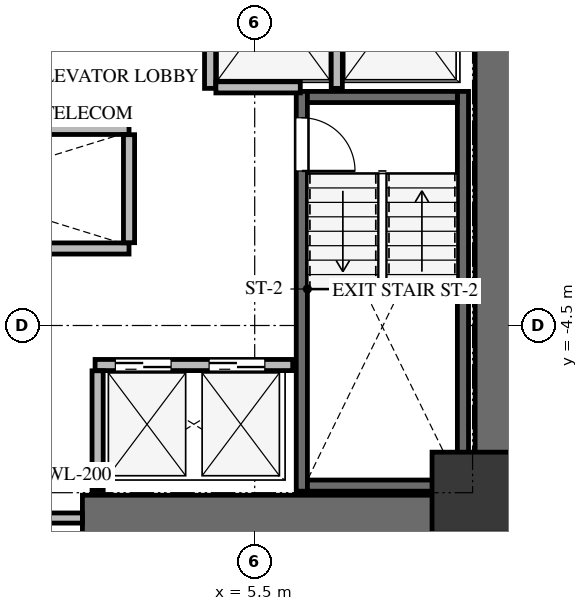
"""IFC4 building model, lengths in metres.
Left out: names, types, materials, properties, quantities, classifications, styles, units other than length and angle.
Written with IfcOpenShell. Run it as: python <this file> out.ifc"""

import sys

from ifc_helpers import new_model, si_unit, direction, frame, frame_2d, origin, origin_2d, place, context, subcontext, project, spatial, rectangle, extrude, source, transform, mapped, element, fill, save


model = new_model("IFC4")
c1 = context("Model", 3, precision=1e-05, world=origin(), true_north=direction((0.0, 1.0)))
c2 = subcontext(c1, "Body", "Model", "MODEL_VIEW")
j1 = project(units=[si_unit("LENGTHUNIT", "METRE"), si_unit("PLANEANGLEUNIT", "RADIAN")], contexts=[c1])
p1 = place(None, origin())
s1 = spatial("IfcSite", under=j1, at=p1, CompositionType="ELEMENT")
p2 = place(p1, origin())
s2 = spatial("IfcBuilding", under=s1, at=p2, CompositionType="ELEMENT")
p3 = place(p2, frame((0.0, 0.0, 78.3)))
s3 = spatial("IfcBuildingStorey", under=s2, at=p3, CompositionType="ELEMENT", Elevation=78.3)
p4 = place(p3, frame((10.3, -8.75, 0.0), z_axis=(0.0, 0.0, 1.0), x_axis=(0.0, 1.0, 0.0)))
e1 = element("IfcWall", 1, at=p4, inside=s3, PredefinedType="SHEAR", context=c2, shape_type="SweptSolid", body=[
    extrude(rectangle(XDim=17.5, YDim=0.9, at=frame_2d((8.75, 0.0))), origin(), (0.0, 0.0, 1.0), 3.0),
])
p5 = place(p3, frame((2.1, -8.3, 0.0), z_axis=(0.0, 0.0, 1.0), x_axis=(1.0, 0.0, 0.0)))
e2 = element("IfcWall", 2, at=p5, inside=s3, PredefinedType="SHEAR", context=c2, shape_type="SweptSolid", body=[
    extrude(rectangle(XDim=7.75, YDim=0.9, at=frame_2d((3.875, 0.0))), origin(), (0.0, 0.0, 1.0), 3.0),
])
p6 = place(p3, frame((9.61, -7.77, -0.24), z_axis=(0.0, 0.0, 1.0), x_axis=(0.0, 1.0, 0.0)))
e3 = element("IfcWall", 3, at=p6, inside=s3, PredefinedType="SHEAR", context=c2, shape_type="SweptSolid", body=[
    extrude(rectangle(XDim=7.89, YDim=0.22, at=frame_2d((3.945, 0.0))), origin(), (0.0, 0.0, 1.0), 3.0),
])
p7 = place(p3, frame((6.43, 0.12, -0.24), z_axis=(0.0, 0.0, 1.0), x_axis=(0.0, -1.0, 0.0)))
e4 = element("IfcWall", 4, at=p7, inside=s3, PredefinedType="SHEAR", context=c2, shape_type="SweptSolid", body=[
    extrude(rectangle(XDim=7.89, YDim=0.22, at=frame_2d((3.945, 0.0))), origin(), (0.0, 0.0, 1.0), 3.0),
])
p8 = place(p7, frame((0.52, 0.0, 0.0)))
e5 = element("IfcOpeningElement", 5, at=p8, cuts=e4, PredefinedType="OPENING", context=c2, shape_type="SweptSolid", body=[
    extrude(rectangle(XDim=1.05, YDim=2.15, at=frame_2d((0.525, 1.075))), frame((0.0, 0.12, 0.0), z_axis=(0.0, -1.0, 0.0), x_axis=(1.0, 0.0, 0.0)), (0.0, 0.0, 1.0), 0.24),
])
for number, where, z_axis, x_axis in (
    (6, (6.54, -7.66, -0.24), (0.0, 0.0, 1.0), (1.0, 0.0, 0.0)),
    (7, (9.5, 0.01, -0.24), (0.0, 0.0, 1.0), (-1.0, 0.0, 0.0)),
):
    element("IfcWall", number, at=place(p3, frame(where, z_axis=z_axis, x_axis=x_axis)), inside=s3, PredefinedType="SHEAR", context=c2, shape_type="SweptSolid", body=[
        extrude(rectangle(XDim=2.96, YDim=0.22, at=frame_2d((1.48, 0.0))), origin(), (0.0, 0.0, 1.0), 3.0),
    ])
m1 = source(origin(), c2, "Body", "SweptSolid", [
    extrude(rectangle(XDim=1.6, YDim=1.6, at=origin_2d()), origin(), (0.0, 0.0, 1.0), 3.0),
])
p9 = place(p3, frame((9.8, -7.8, -0.24), z_axis=(0.0, 0.0, 1.0), x_axis=(1.0, 0.0, 0.0)))
e8 = element("IfcColumn", 8, at=p9, inside=s3, PredefinedType="COLUMN", context=c2, shape_type="MappedRepresentation", body=[
    mapped(m1, transform((0.0, 0.0, 0.0), x_axis=(1.0, 0.0, 0.0), y_axis=(0.0, 1.0, 0.0), z_axis=(0.0, 0.0, 1.0), scale=1.0)),
])
p10 = place(p3, frame((-2.1, -8.3, 0.0), z_axis=(0.0, 0.0, 1.0), x_axis=(1.0, 0.0, 0.0)))
e9 = element("IfcWall", 9, at=p10, inside=s3, PredefinedType="SOLIDWALL", context=c2, shape_type="SweptSolid", body=[
    extrude(rectangle(XDim=4.2, YDim=0.2, at=frame_2d((2.1, 0.0))), origin(), (0.0, 0.0, 1.0), 2.745),
])
p11 = place(p10, frame((1.2, 0.0, 0.0)))
e10 = element("IfcOpeningElement", 10, at=p11, cuts=e9, PredefinedType="OPENING", context=c2, shape_type="SweptSolid", body=[
    extrude(rectangle(XDim=1.8, YDim=2.15, at=frame_2d((0.9, 1.075))), frame((0.0, 0.11, 0.0), z_axis=(0.0, -1.0, 0.0), x_axis=(1.0, 0.0, 0.0)), (0.0, 0.0, 1.0), 0.22),
])
for number, where, z_axis, x_axis in (
    (11, (4.62, 0.18, 0.0), (0.0, 0.0, 1.0), (0.0, 1.0, 0.0)),
    (12, (7.12, 0.18, 0.0), (0.0, 0.0, 1.0), (0.0, 1.0, 0.0)),
):
    element("IfcWall", number, at=place(p3, frame(where, z_axis=z_axis, x_axis=x_axis)), inside=s3, PredefinedType="SOLIDWALL", context=c2, shape_type="SweptSolid", body=[
        extrude(rectangle(XDim=3.186, YDim=0.22, at=frame_2d((1.593, 0.0))), origin(), (0.0, 0.0, 1.0), 2.745),
    ])
p12 = place(p3, frame((4.734, 0.2, 0.0), z_axis=(0.0, 0.0, 1.0), x_axis=(1.0, 0.0, 0.0)))
e13 = element("IfcWall", 13, at=p12, inside=s3, PredefinedType="SOLIDWALL", context=c2, shape_type="SweptSolid", body=[
    extrude(rectangle(XDim=1.666, YDim=0.22, at=frame_2d((0.833, 0.0))), origin(), (0.0, 0.0, 1.0), 2.745),
])
p13 = place(p3, frame((2.35, -5.28, 0.0), z_axis=(0.0, 0.0, 1.0), x_axis=(1.0, 0.0, 0.0)))
e14 = element("IfcWall", 14, at=p13, inside=s3, PredefinedType="SOLIDWALL", context=c2, shape_type="SweptSolid", body=[
    extrude(rectangle(XDim=3.9, YDim=0.22, at=frame_2d((1.95, 0.0))), origin(), (0.0, 0.0, 1.0), 2.745),
])
p14 = place(p13, frame((0.4, 0.0, 0.0)))
e15 = element("IfcOpeningElement", 15, at=p14, cuts=e14, PredefinedType="OPENING", context=c2, shape_type="SweptSolid", body=[
    extrude(rectangle(XDim=1.1, YDim=2.15, at=frame_2d((0.55, 1.075))), frame((0.0, 0.12, 0.0), z_axis=(0.0, -1.0, 0.0), x_axis=(1.0, 0.0, 0.0)), (0.0, 0.0, 1.0), 0.24),
])
p15 = place(p13, frame((2.25, 0.0, 0.0)))
e16 = element("IfcOpeningElement", 16, at=p15, cuts=e14, PredefinedType="OPENING", context=c2, shape_type="SweptSolid", body=[
    extrude(rectangle(XDim=1.1, YDim=2.15, at=frame_2d((0.55, 1.075))), frame((0.0, 0.12, 0.0), z_axis=(0.0, -1.0, 0.0), x_axis=(1.0, 0.0, 0.0)), (0.0, 0.0, 1.0), 0.24),
])
p16 = place(p3, frame((2.4, -7.75, 0.0), z_axis=(0.0, 0.0, 1.0), x_axis=(0.0, 1.0, 0.0)))
e17 = element("IfcWall", 17, at=p16, inside=s3, PredefinedType="SOLIDWALL", context=c2, shape_type="SweptSolid", body=[
    extrude(rectangle(XDim=2.356, YDim=0.22, at=frame_2d((1.178, 0.0))), origin(), (0.0, 0.0, 1.0), 2.745),
])
for number, where, z_axis, x_axis in (
    (18, (-4.22, -2.98, 0.0), (0.0, 0.0, 1.0), (1.0, 0.0, 0.0)),
    (19, (-4.22, -0.62, 0.0), (0.0, 0.0, 1.0), (1.0, 0.0, 0.0)),
):
    element("IfcWall", number, at=place(p3, frame(where, z_axis=z_axis, x_axis=x_axis)), inside=s3, PredefinedType="SOLIDWALL", context=c2, shape_type="SweptSolid", body=[
        extrude(rectangle(XDim=7.24, YDim=0.22, at=frame_2d((3.62, 0.0))), origin(), (0.0, 0.0, 1.0), 2.745),
    ])
p17 = place(p3, frame((3.02, -2.866, 0.0), z_axis=(0.0, 0.0, 1.0), x_axis=(0.0, 1.0, 0.0)))
e20 = element("IfcWall", 20, at=p17, inside=s3, PredefinedType="SOLIDWALL", context=c2, shape_type="SweptSolid", body=[
    extrude(rectangle(XDim=2.132, YDim=0.22, at=frame_2d((1.066, 0.0))), origin(), (0.0, 0.0, 1.0), 2.745),
])
m2 = source(origin(), c2, "Body", "SweptSolid", [
    extrude(rectangle(XDim=1.05, YDim=2.15, at=frame_2d((0.525, 1.075))), frame((0.0, 0.025, 0.0), z_axis=(0.0, -1.0, 0.0), x_axis=(1.0, 0.0, 0.0)), (0.0, 0.0, 1.0), 0.05),
])
p18 = place(p8, origin())
e21 = element("IfcDoor", 21, at=p18, inside=s3, OperationType="SINGLE_SWING_RIGHT", PredefinedType="DOOR", context=c2, shape_type="MappedRepresentation", body=[
    mapped(m2, transform((0.0, 0.0, 0.0), x_axis=(1.0, 0.0, 0.0), y_axis=(0.0, 1.0, 0.0), z_axis=(0.0, 0.0, 1.0), scale=1.0)),
])
fill(e5, e21)
m3 = source(origin(), c2, "Body", "SweptSolid", [
    extrude(rectangle(XDim=1.1, YDim=2.15, at=frame_2d((0.55, 1.075))), frame((0.0, 0.025, 0.0), z_axis=(0.0, -1.0, 0.0), x_axis=(1.0, 0.0, 0.0)), (0.0, 0.0, 1.0), 0.05),
])
p19 = place(p14, origin())
e22 = element("IfcDoor", 22, at=p19, inside=s3, OperationType="DOUBLE_DOOR_SLIDING", PredefinedType="DOOR", context=c2, shape_type="MappedRepresentation", body=[
    mapped(m3, transform((0.0, 0.0, 0.0), x_axis=(1.0, 0.0, 0.0), y_axis=(0.0, 1.0, 0.0), z_axis=(0.0, 0.0, 1.0), scale=1.0)),
])
fill(e15, e22)
p20 = place(p15, origin())
e23 = element("IfcDoor", 23, at=p20, inside=s3, OperationType="DOUBLE_DOOR_SLIDING", PredefinedType="DOOR", context=c2, shape_type="MappedRepresentation", body=[
    mapped(m3, transform((0.0, 0.0, 0.0), x_axis=(1.0, 0.0, 0.0), y_axis=(0.0, 1.0, 0.0), z_axis=(0.0, 0.0, 1.0), scale=1.0)),
])
fill(e16, e23)
save(model, sys.argv[1])
